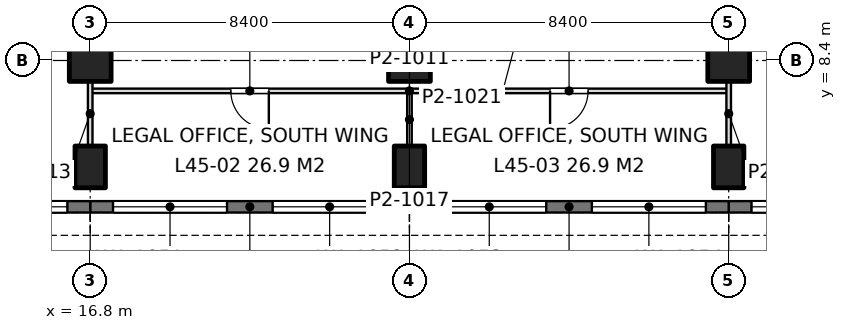
"""IFC4 building model, lengths in metres.
Left out: names, types, materials, properties, quantities, classifications, styles, units other than length and angle.
Written with IfcOpenShell. Run it as: python <this file> out.ifc"""

import sys

from ifc_helpers import new_model, si_unit, direction, frame, frame_2d, origin, origin_2d, place, context, subcontext, project, spatial, rectangle, extrude, element, fill, save


model = new_model("IFC4")
c1 = context("Model", 3, precision=1e-05, world=origin(), true_north=direction((0.0, 1.0)))
c2 = subcontext(c1, "Body", "Model", "MODEL_VIEW")
j1 = project(units=[si_unit("LENGTHUNIT", "METRE"), si_unit("PLANEANGLEUNIT", "RADIAN")], contexts=[c1])
p1 = place(None, origin())
s1 = spatial("IfcSite", under=j1, at=p1, CompositionType="ELEMENT")
p2 = place(p1, origin())
s2 = spatial("IfcBuilding", under=s1, at=p2, CompositionType="ELEMENT")
p3 = place(p2, frame((0.0, 0.0, 198.6)))
s3 = spatial("IfcBuildingStorey", under=s2, at=p3, CompositionType="ELEMENT", Elevation=198.6)
p4 = place(p3, frame((16.8, 5.6, 0.0), z_axis=(0.0, 0.0, 1.0), x_axis=(1.0, 0.0, 0.0)))
e1 = element("IfcColumn", 1, at=p4, inside=s3, PredefinedType="COLUMN", context=c2, shape_type="SweptSolid", body=[
    extrude(rectangle(XDim=0.8, YDim=1.1, at=origin_2d()), origin(), (0.0, 0.0, 1.0), 4.2),
])
p5 = place(p3, frame((16.8, 8.4, 0.0), z_axis=(0.0, 0.0, 1.0), x_axis=(1.0, 0.0, 0.0)))
e2 = element("IfcColumn", 2, at=p5, inside=s3, PredefinedType="COLUMN", context=c2, shape_type="SweptSolid", body=[
    extrude(rectangle(XDim=1.1, YDim=1.1, at=origin_2d()), origin(), (0.0, 0.0, 1.0), 4.2),
])
p6 = place(p3, frame((25.2, 5.6, 0.0), z_axis=(0.0, 0.0, 1.0), x_axis=(1.0, 0.0, 0.0)))
e3 = element("IfcColumn", 3, at=p6, inside=s3, PredefinedType="COLUMN", context=c2, shape_type="SweptSolid", body=[
    extrude(rectangle(XDim=0.8, YDim=1.1, at=origin_2d()), origin(), (0.0, 0.0, 1.0), 4.2),
])
p7 = place(p3, frame((25.2, 8.4, 0.0), z_axis=(0.0, 0.0, 1.0), x_axis=(1.0, 0.0, 0.0)))
e4 = element("IfcColumn", 4, at=p7, inside=s3, PredefinedType="COLUMN", context=c2, shape_type="SweptSolid", body=[
    extrude(rectangle(XDim=1.1, YDim=1.1, at=origin_2d()), origin(), (0.0, 0.0, 1.0), 4.2),
])
p8 = place(p3, frame((33.6, 5.6, 0.0), z_axis=(0.0, 0.0, 1.0), x_axis=(1.0, 0.0, 0.0)))
e5 = element("IfcColumn", 5, at=p8, inside=s3, PredefinedType="COLUMN", context=c2, shape_type="SweptSolid", body=[
    extrude(rectangle(XDim=0.8, YDim=1.1, at=origin_2d()), origin(), (0.0, 0.0, 1.0), 4.2),
])
p9 = place(p3, frame((33.6, 8.4, 0.0), z_axis=(0.0, 0.0, 1.0), x_axis=(1.0, 0.0, 0.0)))
e6 = element("IfcColumn", 6, at=p9, inside=s3, PredefinedType="COLUMN", context=c2, shape_type="SweptSolid", body=[
    extrude(rectangle(XDim=1.1, YDim=1.1, at=origin_2d()), origin(), (0.0, 0.0, 1.0), 4.2),
])
p10 = place(p3, frame((42.0, 4.55, 0.0), z_axis=(0.0, 0.0, 1.0), x_axis=(-1.0, 0.0, 0.0)))
e7 = element("IfcWall", 7, at=p10, inside=s3, PredefinedType="SOLIDWALL", context=c2, shape_type="SweptSolid", body=[
    extrude(rectangle(XDim=8.4, YDim=0.3, at=frame_2d((4.2, 0.0))), origin(), (0.0, 0.0, 1.0), 4.05),
])
p11 = place(p10, frame((0.6, 0.0, 0.9)))
e8 = element("IfcOpeningElement", 8, at=p11, cuts=e7, PredefinedType="OPENING", context=c2, shape_type="SweptSolid", body=[
    extrude(rectangle(XDim=3.0, YDim=1.9, at=frame_2d((1.5, 0.95))), frame((0.0, 0.16, 0.0), z_axis=(0.0, -1.0, 0.0), x_axis=(1.0, 0.0, 0.0)), (0.0, 0.0, 1.0), 0.32),
])
p12 = place(p10, frame((4.8, 0.0, 0.9)))
e9 = element("IfcOpeningElement", 9, at=p12, cuts=e7, PredefinedType="OPENING", context=c2, shape_type="SweptSolid", body=[
    extrude(rectangle(XDim=3.0, YDim=1.9, at=frame_2d((1.5, 0.95))), frame((0.0, 0.16, 0.0), z_axis=(0.0, -1.0, 0.0), x_axis=(1.0, 0.0, 0.0)), (0.0, 0.0, 1.0), 0.32),
])
p13 = place(p3, frame((33.6, 4.55, 0.0), z_axis=(0.0, 0.0, 1.0), x_axis=(-1.0, 0.0, 0.0)))
e10 = element("IfcWall", 10, at=p13, inside=s3, PredefinedType="SOLIDWALL", context=c2, shape_type="SweptSolid", body=[
    extrude(rectangle(XDim=8.4, YDim=0.3, at=frame_2d((4.2, 0.0))), origin(), (0.0, 0.0, 1.0), 4.05),
])
p14 = place(p13, frame((0.6, 0.0, 0.9)))
e11 = element("IfcOpeningElement", 11, at=p14, cuts=e10, PredefinedType="OPENING", context=c2, shape_type="SweptSolid", body=[
    extrude(rectangle(XDim=3.0, YDim=1.9, at=frame_2d((1.5, 0.95))), frame((0.0, 0.16, 0.0), z_axis=(0.0, -1.0, 0.0), x_axis=(1.0, 0.0, 0.0)), (0.0, 0.0, 1.0), 0.32),
])
p15 = place(p13, frame((4.8, 0.0, 0.9)))
e12 = element("IfcOpeningElement", 12, at=p15, cuts=e10, PredefinedType="OPENING", context=c2, shape_type="SweptSolid", body=[
    extrude(rectangle(XDim=3.0, YDim=1.9, at=frame_2d((1.5, 0.95))), frame((0.0, 0.16, 0.0), z_axis=(0.0, -1.0, 0.0), x_axis=(1.0, 0.0, 0.0)), (0.0, 0.0, 1.0), 0.32),
])
p16 = place(p3, frame((25.2, 4.55, 0.0), z_axis=(0.0, 0.0, 1.0), x_axis=(-1.0, 0.0, 0.0)))
e13 = element("IfcWall", 13, at=p16, inside=s3, PredefinedType="SOLIDWALL", context=c2, shape_type="SweptSolid", body=[
    extrude(rectangle(XDim=8.4, YDim=0.3, at=frame_2d((4.2, 0.0))), origin(), (0.0, 0.0, 1.0), 4.05),
])
p17 = place(p16, frame((0.6, 0.0, 0.9)))
e14 = element("IfcOpeningElement", 14, at=p17, cuts=e13, PredefinedType="OPENING", context=c2, shape_type="SweptSolid", body=[
    extrude(rectangle(XDim=3.0, YDim=1.9, at=frame_2d((1.5, 0.95))), frame((0.0, 0.16, 0.0), z_axis=(0.0, -1.0, 0.0), x_axis=(1.0, 0.0, 0.0)), (0.0, 0.0, 1.0), 0.32),
])
p18 = place(p16, frame((4.8, 0.0, 0.9)))
e15 = element("IfcOpeningElement", 15, at=p18, cuts=e13, PredefinedType="OPENING", context=c2, shape_type="SweptSolid", body=[
    extrude(rectangle(XDim=3.0, YDim=1.9, at=frame_2d((1.5, 0.95))), frame((0.0, 0.16, 0.0), z_axis=(0.0, -1.0, 0.0), x_axis=(1.0, 0.0, 0.0)), (0.0, 0.0, 1.0), 0.32),
])
p19 = place(p3, frame((16.8, 4.55, 0.0), z_axis=(0.0, 0.0, 1.0), x_axis=(-1.0, 0.0, 0.0)))
e16 = element("IfcWall", 16, at=p19, inside=s3, PredefinedType="SOLIDWALL", context=c2, shape_type="SweptSolid", body=[
    extrude(rectangle(XDim=8.4, YDim=0.3, at=frame_2d((4.2, 0.0))), origin(), (0.0, 0.0, 1.0), 4.05),
])
p20 = place(p19, frame((0.6, 0.0, 0.9)))
e17 = element("IfcOpeningElement", 17, at=p20, cuts=e16, PredefinedType="OPENING", context=c2, shape_type="SweptSolid", body=[
    extrude(rectangle(XDim=3.0, YDim=1.9, at=frame_2d((1.5, 0.95))), frame((0.0, 0.16, 0.0), z_axis=(0.0, -1.0, 0.0), x_axis=(1.0, 0.0, 0.0)), (0.0, 0.0, 1.0), 0.32),
])
p21 = place(p19, frame((4.8, 0.0, 0.9)))
e18 = element("IfcOpeningElement", 18, at=p21, cuts=e16, PredefinedType="OPENING", context=c2, shape_type="SweptSolid", body=[
    extrude(rectangle(XDim=3.0, YDim=1.9, at=frame_2d((1.5, 0.95))), frame((0.0, 0.16, 0.0), z_axis=(0.0, -1.0, 0.0), x_axis=(1.0, 0.0, 0.0)), (0.0, 0.0, 1.0), 0.32),
])
p22 = place(p3, frame((16.8, 7.6, 0.0), z_axis=(0.0, 0.0, 1.0), x_axis=(1.0, 0.0, 0.0)))
e19 = element("IfcWall", 19, at=p22, inside=s3, PredefinedType="PARTITIONING", context=c2, shape_type="SweptSolid", body=[
    extrude(rectangle(XDim=16.8, YDim=0.12, at=frame_2d((8.4, 0.0))), origin(), (0.0, 0.0, 1.0), 3.69),
])
p23 = place(p22, frame((3.7, 0.0, 0.0)))
e20 = element("IfcOpeningElement", 20, at=p23, cuts=e19, PredefinedType="OPENING", context=c2, shape_type="SweptSolid", body=[
    extrude(rectangle(XDim=1.0, YDim=2.4, at=frame_2d((0.5, 1.2))), frame((0.0, 0.07, 0.0), z_axis=(0.0, -1.0, 0.0), x_axis=(1.0, 0.0, 0.0)), (0.0, 0.0, 1.0), 0.14),
])
p24 = place(p22, frame((12.1, 0.0, 0.0)))
e21 = element("IfcOpeningElement", 21, at=p24, cuts=e19, PredefinedType="OPENING", context=c2, shape_type="SweptSolid", body=[
    extrude(rectangle(XDim=1.0, YDim=2.4, at=frame_2d((0.5, 1.2))), frame((0.0, 0.07, 0.0), z_axis=(0.0, -1.0, 0.0), x_axis=(1.0, 0.0, 0.0)), (0.0, 0.0, 1.0), 0.14),
])
p25 = place(p3, frame((16.8, 6.149, 0.0), z_axis=(0.0, 0.0, 1.0), x_axis=(0.0, 1.0, 0.0)))
e22 = element("IfcWall", 22, at=p25, inside=s3, PredefinedType="PARTITIONING", context=c2, shape_type="SweptSolid", body=[
    extrude(rectangle(XDim=1.703, YDim=0.12, at=frame_2d((0.852, 0.0))), origin(), (0.0, 0.0, 1.0), 3.69),
])
p26 = place(p3, frame((25.2, 6.149, 0.0), z_axis=(0.0, 0.0, 1.0), x_axis=(0.0, 1.0, 0.0)))
e23 = element("IfcWall", 23, at=p26, inside=s3, PredefinedType="PARTITIONING", context=c2, shape_type="SweptSolid", body=[
    extrude(rectangle(XDim=1.393, YDim=0.12, at=frame_2d((0.697, 0.0))), origin(), (0.0, 0.0, 1.0), 3.69),
])
p27 = place(p3, frame((33.6, 6.149, 0.0), z_axis=(0.0, 0.0, 1.0), x_axis=(0.0, 1.0, 0.0)))
e24 = element("IfcWall", 24, at=p27, inside=s3, PredefinedType="PARTITIONING", context=c2, shape_type="SweptSolid", body=[
    extrude(rectangle(XDim=1.703, YDim=0.12, at=frame_2d((0.852, 0.0))), origin(), (0.0, 0.0, 1.0), 3.69),
])
p28 = place(p12, origin())
e25 = element("IfcWindow", 25, at=p28, inside=s3, PartitioningType="SINGLE_PANEL", PredefinedType="WINDOW", context=c2, shape_type="SweptSolid", body=[
    extrude(rectangle(XDim=3.0, YDim=1.9, at=frame_2d((1.5, 0.95))), frame((0.0, 0.03, 0.0), z_axis=(0.0, -1.0, 0.0), x_axis=(1.0, 0.0, 0.0)), (0.0, 0.0, 1.0), 0.06),
])
fill(e9, e25)
p29 = place(p14, origin())
e26 = element("IfcWindow", 26, at=p29, inside=s3, PartitioningType="SINGLE_PANEL", PredefinedType="WINDOW", context=c2, shape_type="SweptSolid", body=[
    extrude(rectangle(XDim=3.0, YDim=1.9, at=frame_2d((1.5, 0.95))), frame((0.0, 0.03, 0.0), z_axis=(0.0, -1.0, 0.0), x_axis=(1.0, 0.0, 0.0)), (0.0, 0.0, 1.0), 0.06),
])
fill(e11, e26)
p30 = place(p15, origin())
e27 = element("IfcWindow", 27, at=p30, inside=s3, PartitioningType="SINGLE_PANEL", PredefinedType="WINDOW", context=c2, shape_type="SweptSolid", body=[
    extrude(rectangle(XDim=3.0, YDim=1.9, at=frame_2d((1.5, 0.95))), frame((0.0, 0.03, 0.0), z_axis=(0.0, -1.0, 0.0), x_axis=(1.0, 0.0, 0.0)), (0.0, 0.0, 1.0), 0.06),
])
fill(e12, e27)
p31 = place(p17, origin())
e28 = element("IfcWindow", 28, at=p31, inside=s3, PartitioningType="SINGLE_PANEL", PredefinedType="WINDOW", context=c2, shape_type="SweptSolid", body=[
    extrude(rectangle(XDim=3.0, YDim=1.9, at=frame_2d((1.5, 0.95))), frame((0.0, 0.03, 0.0), z_axis=(0.0, -1.0, 0.0), x_axis=(1.0, 0.0, 0.0)), (0.0, 0.0, 1.0), 0.06),
])
fill(e14, e28)
p32 = place(p18, origin())
e29 = element("IfcWindow", 29, at=p32, inside=s3, PartitioningType="SINGLE_PANEL", PredefinedType="WINDOW", context=c2, shape_type="SweptSolid", body=[
    extrude(rectangle(XDim=3.0, YDim=1.9, at=frame_2d((1.5, 0.95))), frame((0.0, 0.03, 0.0), z_axis=(0.0, -1.0, 0.0), x_axis=(1.0, 0.0, 0.0)), (0.0, 0.0, 1.0), 0.06),
])
fill(e15, e29)
p33 = place(p20, origin())
e30 = element("IfcWindow", 30, at=p33, inside=s3, PartitioningType="SINGLE_PANEL", PredefinedType="WINDOW", context=c2, shape_type="SweptSolid", body=[
    extrude(rectangle(XDim=3.0, YDim=1.9, at=frame_2d((1.5, 0.95))), frame((0.0, 0.03, 0.0), z_axis=(0.0, -1.0, 0.0), x_axis=(1.0, 0.0, 0.0)), (0.0, 0.0, 1.0), 0.06),
])
fill(e17, e30)
p34 = place(p23, frame((1.0, 0.0, 0.0), z_axis=(0.0, 0.0, 1.0), x_axis=(-1.0, 0.0, 0.0)))
e31 = element("IfcDoor", 31, at=p34, inside=s3, OperationType="SINGLE_SWING_LEFT", PredefinedType="DOOR", context=c2, shape_type="SweptSolid", body=[
    extrude(rectangle(XDim=1.0, YDim=2.4, at=frame_2d((0.5, 1.2))), frame((0.0, 0.025, 0.0), z_axis=(0.0, -1.0, 0.0), x_axis=(1.0, 0.0, 0.0)), (0.0, 0.0, 1.0), 0.05),
])
fill(e20, e31)
p35 = place(p24, frame((1.0, 0.0, 0.0), z_axis=(0.0, 0.0, 1.0), x_axis=(-1.0, 0.0, 0.0)))
e32 = element("IfcDoor", 32, at=p35, inside=s3, OperationType="SINGLE_SWING_RIGHT", PredefinedType="DOOR", context=c2, shape_type="SweptSolid", body=[
    extrude(rectangle(XDim=1.0, YDim=2.4, at=frame_2d((0.5, 1.2))), frame((0.0, 0.025, 0.0), z_axis=(0.0, -1.0, 0.0), x_axis=(1.0, 0.0, 0.0)), (0.0, 0.0, 1.0), 0.05),
])
fill(e21, e32)
save(model, sys.argv[1])
